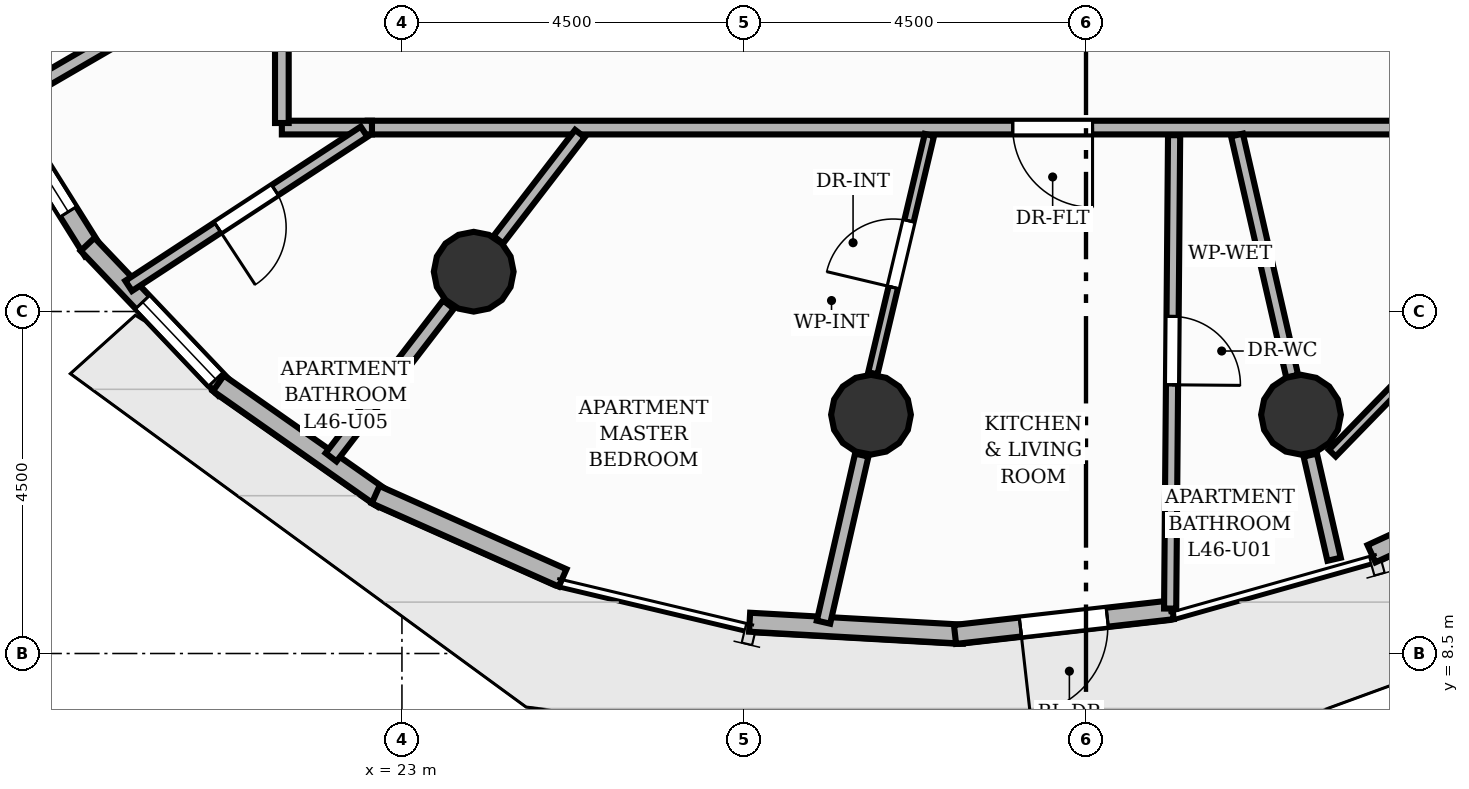
"""IFC4 building model, lengths in metres.
Left out: names, types, materials, properties, quantities, classifications, styles, units other than length and angle.
Written with IfcOpenShell. Run it as: python <this file> out.ifc"""

import sys

from ifc_helpers import new_model, si_unit, direction, frame, frame_2d, origin, origin_2d, place, context, subcontext, project, spatial, rectangle, circle, extrude, element, fill, save


model = new_model("IFC4")
c1 = context("Model", 3, precision=1e-05, world=origin(), true_north=direction((0.0, 1.0)))
c2 = subcontext(c1, "Body", "Model", "MODEL_VIEW")
j1 = project(units=[si_unit("LENGTHUNIT", "METRE"), si_unit("PLANEANGLEUNIT", "RADIAN")], contexts=[c1])
p1 = place(None, origin())
s1 = spatial("IfcSite", under=j1, at=p1, CompositionType="ELEMENT")
p2 = place(p1, origin())
s2 = spatial("IfcBuilding", under=s1, at=p2, CompositionType="ELEMENT")
p3 = place(p2, frame((0.0, 0.0, 155.36)))
s3 = spatial("IfcBuildingStorey", under=s2, at=p3, CompositionType="ELEMENT", Elevation=155.36)
for number, where, z_axis, x_axis in (
    (1, (23.944, 13.523, 0.0), (0.0, 0.0, 1.0), (1.0, 0.0, 0.0)),
    (2, (29.171, 11.642, 0.0), (0.0, 0.0, 1.0), (1.0, 0.0, 0.0)),
    (3, (34.829, 11.642, 0.0), (0.0, 0.0, 1.0), (1.0, 0.0, 0.0)),
):
    element("IfcColumn", number, at=place(p3, frame(where, z_axis=z_axis, x_axis=x_axis)), inside=s3, PredefinedType="COLUMN", context=c2, shape_type="SweptSolid", body=[
        extrude(circle(Radius=0.525, at=origin_2d()), origin(), (0.0, 0.0, 1.0), 3.2),
    ])
p4 = place(p3, frame((18.934, 13.793, 0.0), z_axis=(0.0, 0.0, 1.0), x_axis=(-0.530726374543, 0.847543223302, 0.0)))
e4 = element("IfcWall", 4, at=p4, inside=s3, PredefinedType="SOLIDWALL", context=c2, shape_type="SweptSolid", body=[
    extrude(rectangle(XDim=2.624, YDim=0.25, at=frame_2d((1.312, 0.0))), origin(), (0.0, 0.0, 1.0), 2.8),
])
p5 = place(p4, frame((0.612, 0.0, 0.85)))
e5 = element("IfcOpeningElement", 5, at=p5, cuts=e4, PredefinedType="OPENING", context=c2, shape_type="SweptSolid", body=[
    extrude(rectangle(XDim=1.4, YDim=1.29, at=frame_2d((0.7, 0.645))), frame((0.0, 0.135, 0.0), z_axis=(0.0, -1.0, 0.0), x_axis=(1.0, 0.0, 0.0)), (0.0, 0.0, 1.0), 0.27),
])
p6 = place(p3, frame((20.672, 11.981, 0.0), z_axis=(0.0, 0.0, 1.0), x_axis=(-0.688923042016, 0.724834492957, 0.0)))
e6 = element("IfcWall", 6, at=p6, inside=s3, PredefinedType="SOLIDWALL", context=c2, shape_type="SweptSolid", body=[
    extrude(rectangle(XDim=2.624, YDim=0.25, at=frame_2d((1.312, 0.0))), origin(), (0.0, 0.0, 1.0), 2.8),
])
p7 = place(p6, frame((0.175, 0.0, 0.85)))
e7 = element("IfcOpeningElement", 7, at=p7, cuts=e6, PredefinedType="OPENING", context=c2, shape_type="SweptSolid", body=[
    extrude(rectangle(XDim=1.4, YDim=1.55, at=frame_2d((0.7, 0.775))), frame((0.0, 0.135, 0.0), z_axis=(0.0, -1.0, 0.0), x_axis=(1.0, 0.0, 0.0)), (0.0, 0.0, 1.0), 0.27),
])
p8 = place(p3, frame((22.753, 10.534, 0.0), z_axis=(0.0, 0.0, 1.0), x_axis=(-0.818434239786, 0.574600204617, 0.0)))
e8 = element("IfcWall", 8, at=p8, inside=s3, PredefinedType="SOLIDWALL", context=c2, shape_type="SweptSolid", body=[
    extrude(rectangle(XDim=2.648, YDim=0.25, at=frame_2d((1.324, 0.0))), origin(), (0.0, 0.0, 1.0), 2.8),
])
p9 = place(p3, frame((25.114, 9.495, 0.0), z_axis=(0.0, 0.0, 1.0), x_axis=(-0.913598321014, 0.406617889228, 0.0)))
e9 = element("IfcWall", 9, at=p9, inside=s3, PredefinedType="SOLIDWALL", context=c2, shape_type="SweptSolid", body=[
    extrude(rectangle(XDim=2.693, YDim=0.25, at=frame_2d((1.346, 0.0))), origin(), (0.0, 0.0, 1.0), 2.8),
])
p10 = place(p3, frame((30.387, 8.754, 0.0), z_axis=(0.0, 0.0, 1.0), x_axis=(-0.998436800423, 0.055892356906, 0.0)))
e10 = element("IfcWall", 10, at=p10, inside=s3, PredefinedType="SOLIDWALL", context=c2, shape_type="SweptSolid", body=[
    extrude(rectangle(XDim=2.817, YDim=0.25, at=frame_2d((1.409, 0.0))), origin(), (0.0, 0.0, 1.0), 2.8),
])
p11 = place(p3, frame((33.14, 9.076, 0.0), z_axis=(0.0, 0.0, 1.0), x_axis=(-0.993631150985, -0.112681568111, 0.0)))
e11 = element("IfcWall", 11, at=p11, inside=s3, PredefinedType="SOLIDWALL", context=c2, shape_type="SweptSolid", body=[
    extrude(rectangle(XDim=2.882, YDim=0.25, at=frame_2d((1.441, 0.0))), origin(), (0.0, 0.0, 1.0), 2.8),
])
p12 = place(p11, frame((0.866, 0.0, 0.0)))
e12 = element("IfcOpeningElement", 12, at=p12, cuts=e11, PredefinedType="OPENING", context=c2, shape_type="SweptSolid", body=[
    extrude(rectangle(XDim=1.15, YDim=2.2, at=frame_2d((0.575, 1.1))), frame((0.0, 0.135, 0.0), z_axis=(0.0, -1.0, 0.0), x_axis=(1.0, 0.0, 0.0)), (0.0, 0.0, 1.0), 0.27),
])
p13 = place(p3, frame((38.461, 11.056, 0.0), z_axis=(0.0, 0.0, 1.0), x_axis=(-0.908594420046, -0.417679518124, 0.0)))
e13 = element("IfcWall", 13, at=p13, inside=s3, PredefinedType="SOLIDWALL", context=c2, shape_type="SweptSolid", body=[
    extrude(rectangle(XDim=2.977, YDim=0.25, at=frame_2d((1.489, 0.0))), origin(), (0.0, 0.0, 1.0), 2.8),
])
p14 = place(p13, frame((0.664, 0.0, 0.85)))
e14 = element("IfcOpeningElement", 14, at=p14, cuts=e13, PredefinedType="OPENING", context=c2, shape_type="SweptSolid", body=[
    extrude(rectangle(XDim=1.65, YDim=1.55, at=frame_2d((0.825, 0.775))), frame((0.0, 0.135, 0.0), z_axis=(0.0, -1.0, 0.0), x_axis=(1.0, 0.0, 0.0)), (0.0, 0.0, 1.0), 0.27),
])
p15 = place(p3, frame((19.472, 16.726, 0.0), z_axis=(0.0, 0.0, 1.0), x_axis=(-0.864794183852, -0.502126497584, 0.0)))
e15 = element("IfcWall", 15, at=p15, inside=s3, PredefinedType="PARTITIONING", context=c2, shape_type="SweptSolid", body=[
    extrude(rectangle(XDim=1.959, YDim=0.18, at=frame_2d((0.979, 0.0))), origin(), (0.0, 0.0, 1.0), 2.176),
])
p16 = place(p3, frame((23.612, 13.092, 0.0), z_axis=(0.0, 0.0, 1.0), x_axis=(-0.609529171404, -0.79276364019, 0.0)))
e16 = element("IfcWall", 16, at=p16, inside=s3, PredefinedType="PARTITIONING", context=c2, shape_type="SweptSolid", body=[
    extrude(rectangle(XDim=2.534, YDim=0.18, at=frame_2d((1.267, 0.0))), origin(), (0.0, 0.0, 1.0), 2.176),
])
p17 = place(p3, frame((29.05, 11.111, 0.0), z_axis=(0.0, 0.0, 1.0), x_axis=(-0.223104026265, -0.974794641688, 0.0)))
e17 = element("IfcWall", 17, at=p17, inside=s3, PredefinedType="PARTITIONING", context=c2, shape_type="SweptSolid", body=[
    extrude(rectangle(XDim=2.255, YDim=0.18, at=frame_2d((1.128, 0.0))), origin(), (0.0, 0.0, 1.0), 2.176),
])
p18 = place(p3, frame((34.95, 11.111, 0.0), z_axis=(0.0, 0.0, 1.0), x_axis=(0.223121817242, -0.974790569646, 0.0)))
e18 = element("IfcWall", 18, at=p18, inside=s3, PredefinedType="PARTITIONING", context=c2, shape_type="SweptSolid", body=[
    extrude(rectangle(XDim=1.406, YDim=0.18, at=frame_2d((0.703, 0.0))), origin(), (0.0, 0.0, 1.0), 2.176),
])
p19 = place(p3, frame((39.08, 15.42, 0.0), z_axis=(0.0, 0.0, 1.0), x_axis=(-1.0, 0.0, 0.0)))
e19 = element("IfcWall", 19, at=p19, inside=s3, PredefinedType="PARTITIONING", context=c2, shape_type="SweptSolid", body=[
    extrude(rectangle(XDim=16.531, YDim=0.18, at=frame_2d((8.266, 0.0))), origin(), (0.0, 0.0, 1.0), 2.795),
])
p20 = place(p19, frame((6.994, 0.0, 0.0)))
e20 = element("IfcOpeningElement", 20, at=p20, cuts=e19, PredefinedType="OPENING", context=c2, shape_type="SweptSolid", body=[
    extrude(rectangle(XDim=1.05, YDim=2.15, at=frame_2d((0.525, 1.075))), frame((0.0, 0.1, 0.0), z_axis=(0.0, -1.0, 0.0), x_axis=(1.0, 0.0, 0.0)), (0.0, 0.0, 1.0), 0.2),
])
p21 = place(p3, frame((22.606, 15.42, 0.0), z_axis=(0.0, 0.0, 1.0), x_axis=(-1.0, 0.0, 0.0)))
e21 = element("IfcWall", 21, at=p21, inside=s3, PredefinedType="PARTITIONING", context=c2, shape_type="SweptSolid", body=[
    extrude(rectangle(XDim=1.186, YDim=0.18, at=frame_2d((0.593, 0.0))), origin(), (0.0, 0.0, 1.0), 2.795),
])
p22 = place(p3, frame((21.42, 15.48, 0.0), z_axis=(0.0, 0.0, 1.0), x_axis=(0.0, 1.0, 0.0)))
e22 = element("IfcWall", 22, at=p22, inside=s3, PredefinedType="PARTITIONING", context=c2, shape_type="SweptSolid", body=[
    extrude(rectangle(XDim=6.12, YDim=0.18, at=frame_2d((3.06, 0.0))), origin(), (0.0, 0.0, 1.0), 2.795),
])
p23 = place(p22, frame((2.312, 0.0, 0.0)))
e23 = element("IfcOpeningElement", 23, at=p23, cuts=e22, PredefinedType="OPENING", context=c2, shape_type="SweptSolid", body=[
    extrude(rectangle(XDim=1.05, YDim=2.15, at=frame_2d((0.525, 1.075))), frame((0.0, 0.1, 0.0), z_axis=(0.0, -1.0, 0.0), x_axis=(1.0, 0.0, 0.0)), (0.0, 0.0, 1.0), 0.2),
])
p24 = place(p3, frame((33.159, 15.32, 0.0), z_axis=(0.0, 0.0, 1.0), x_axis=(-0.008387256911, -0.999964826342, 0.0)))
e24 = element("IfcWall", 24, at=p24, inside=s3, PredefinedType="PLUMBINGWALL", context=c2, shape_type="SweptSolid", body=[
    extrude(rectangle(XDim=6.229, YDim=0.16, at=frame_2d((3.115, 0.0))), origin(), (0.0, 0.0, 1.0), 2.795),
])
p25 = place(p24, frame((2.385, 0.0, 0.0)))
e25 = element("IfcOpeningElement", 25, at=p25, cuts=e24, PredefinedType="OPENING", context=c2, shape_type="SweptSolid", body=[
    extrude(rectangle(XDim=0.9, YDim=2.1, at=frame_2d((0.45, 1.05))), frame((0.0, 0.09, 0.0), z_axis=(0.0, -1.0, 0.0), x_axis=(1.0, 0.0, 0.0)), (0.0, 0.0, 1.0), 0.18),
])
p26 = place(p3, frame((29.196, 12.187, 0.0), z_axis=(0.0, 0.0, 1.0), x_axis=(0.230968453673, 0.972961239417, 0.0)))
e26 = element("IfcWall", 26, at=p26, inside=s3, PredefinedType="PARTITIONING", context=c2, shape_type="SweptSolid", body=[
    extrude(rectangle(XDim=3.223, YDim=0.125, at=frame_2d((1.611, 0.0))), origin(), (0.0, 0.0, 1.0), 2.176),
])
p27 = place(p26, frame((1.161, 0.0, 0.0)))
e27 = element("IfcOpeningElement", 27, at=p27, cuts=e26, PredefinedType="OPENING", context=c2, shape_type="SweptSolid", body=[
    extrude(rectangle(XDim=0.9, YDim=2.1, at=frame_2d((0.45, 1.05))), frame((0.0, 0.073, 0.0), z_axis=(0.0, -1.0, 0.0), x_axis=(1.0, 0.0, 0.0)), (0.0, 0.0, 1.0), 0.145),
])
p28 = place(p3, frame((33.986, 15.323, 0.0), z_axis=(0.0, 0.0, 1.0), x_axis=(0.223166862669, -0.97478025801, 0.0)))
e28 = element("IfcWall", 28, at=p28, inside=s3, PredefinedType="PLUMBINGWALL", context=c2, shape_type="SweptSolid", body=[
    extrude(rectangle(XDim=3.256, YDim=0.16, at=frame_2d((1.628, 0.0))), origin(), (0.0, 0.0, 1.0), 2.176),
])
p29 = place(p3, frame((24.268, 13.944, 0.0), z_axis=(0.0, 0.0, 1.0), x_axis=(0.609536601946, 0.792757927042, 0.0)))
e29 = element("IfcWall", 29, at=p29, inside=s3, PredefinedType="PLUMBINGWALL", context=c2, shape_type="SweptSolid", body=[
    extrude(rectangle(XDim=1.761, YDim=0.16, at=frame_2d((0.881, 0.0))), origin(), (0.0, 0.0, 1.0), 2.176),
])
p30 = place(p3, frame((44.336, 20.497, 0.0), z_axis=(0.0, 0.0, 1.0), x_axis=(-0.696857448942, -0.717209659621, 0.0)))
e30 = element("IfcWall", 30, at=p30, inside=s3, PredefinedType="PARTITIONING", context=c2, shape_type="SweptSolid", body=[
    extrude(rectangle(XDim=13.052, YDim=0.125, at=frame_2d((6.526, 0.0))), origin(), (0.0, 0.0, 1.0), 2.251),
])
p31 = place(p30, frame((5.516, 0.0, 0.0)))
e31 = element("IfcOpeningElement", 31, at=p31, cuts=e30, PredefinedType="OPENING", context=c2, shape_type="SweptSolid", body=[
    extrude(rectangle(XDim=0.9, YDim=2.1, at=frame_2d((0.45, 1.05))), frame((0.0, 0.073, 0.0), z_axis=(0.0, -1.0, 0.0), x_axis=(1.0, 0.0, 0.0)), (0.0, 0.0, 1.0), 0.145),
])
p32 = place(p3, frame((22.502, 15.365, 0.0), z_axis=(0.0, 0.0, 1.0), x_axis=(-0.836626802071, -0.547773305352, 0.0)))
e32 = element("IfcWall", 32, at=p32, inside=s3, PredefinedType="PLUMBINGWALL", context=c2, shape_type="SweptSolid", body=[
    extrude(rectangle(XDim=3.703, YDim=0.16, at=frame_2d((1.852, 0.0))), origin(), (0.0, 0.0, 1.0), 2.795),
])
p33 = place(p32, frame((1.401, 0.0, 0.0)))
e33 = element("IfcOpeningElement", 33, at=p33, cuts=e32, PredefinedType="OPENING", context=c2, shape_type="SweptSolid", body=[
    extrude(rectangle(XDim=0.9, YDim=2.1, at=frame_2d((0.45, 1.05))), frame((0.0, 0.09, 0.0), z_axis=(0.0, -1.0, 0.0), x_axis=(1.0, 0.0, 0.0)), (0.0, 0.0, 1.0), 0.18),
])
p34 = place(p12, origin())
e34 = element("IfcDoor", 34, at=p34, inside=s3, OperationType="SINGLE_SWING_RIGHT", PredefinedType="DOOR", context=c2, shape_type="SweptSolid", body=[
    extrude(rectangle(XDim=1.15, YDim=2.2, at=frame_2d((0.575, 1.1))), frame((0.0, 0.025, 0.0), z_axis=(0.0, -1.0, 0.0), x_axis=(1.0, 0.0, 0.0)), (0.0, 0.0, 1.0), 0.05),
])
fill(e12, e34)
p35 = place(p5, origin())
e35 = element("IfcWindow", 35, at=p35, inside=s3, PartitioningType="SINGLE_PANEL", PredefinedType="WINDOW", context=c2, shape_type="SweptSolid", body=[
    extrude(rectangle(XDim=1.4, YDim=1.29, at=frame_2d((0.7, 0.645))), frame((0.0, 0.03, 0.0), z_axis=(0.0, -1.0, 0.0), x_axis=(1.0, 0.0, 0.0)), (0.0, 0.0, 1.0), 0.06),
])
fill(e5, e35)
p36 = place(p7, origin())
e36 = element("IfcWindow", 36, at=p36, inside=s3, PartitioningType="SINGLE_PANEL", PredefinedType="WINDOW", context=c2, shape_type="SweptSolid", body=[
    extrude(rectangle(XDim=1.4, YDim=1.55, at=frame_2d((0.7, 0.775))), frame((0.0, 0.03, 0.0), z_axis=(0.0, -1.0, 0.0), x_axis=(1.0, 0.0, 0.0)), (0.0, 0.0, 1.0), 0.06),
])
fill(e7, e36)
p37 = place(p20, origin())
e37 = element("IfcDoor", 37, at=p37, inside=s3, OperationType="SINGLE_SWING_LEFT", PredefinedType="DOOR", context=c2, shape_type="SweptSolid", body=[
    extrude(rectangle(XDim=1.05, YDim=2.15, at=frame_2d((0.525, 1.075))), frame((0.0, 0.025, 0.0), z_axis=(0.0, -1.0, 0.0), x_axis=(1.0, 0.0, 0.0)), (0.0, 0.0, 1.0), 0.05),
])
fill(e20, e37)
p38 = place(p25, origin())
e38 = element("IfcDoor", 38, at=p38, inside=s3, OperationType="SINGLE_SWING_RIGHT", PredefinedType="DOOR", context=c2, shape_type="SweptSolid", body=[
    extrude(rectangle(XDim=0.9, YDim=2.1, at=frame_2d((0.45, 1.05))), frame((0.0, 0.025, 0.0), z_axis=(0.0, -1.0, 0.0), x_axis=(1.0, 0.0, 0.0)), (0.0, 0.0, 1.0), 0.05),
])
fill(e25, e38)
p39 = place(p27, origin())
e39 = element("IfcDoor", 39, at=p39, inside=s3, OperationType="SINGLE_SWING_LEFT", PredefinedType="DOOR", context=c2, shape_type="SweptSolid", body=[
    extrude(rectangle(XDim=0.9, YDim=2.1, at=frame_2d((0.45, 1.05))), frame((0.0, 0.025, 0.0), z_axis=(0.0, -1.0, 0.0), x_axis=(1.0, 0.0, 0.0)), (0.0, 0.0, 1.0), 0.05),
])
fill(e27, e39)
p40 = place(p33, origin())
e40 = element("IfcDoor", 40, at=p40, inside=s3, OperationType="SINGLE_SWING_RIGHT", PredefinedType="DOOR", context=c2, shape_type="SweptSolid", body=[
    extrude(rectangle(XDim=0.9, YDim=2.1, at=frame_2d((0.45, 1.05))), frame((0.0, 0.025, 0.0), z_axis=(0.0, -1.0, 0.0), x_axis=(1.0, 0.0, 0.0)), (0.0, 0.0, 1.0), 0.05),
])
fill(e33, e40)
save(model, sys.argv[1])
